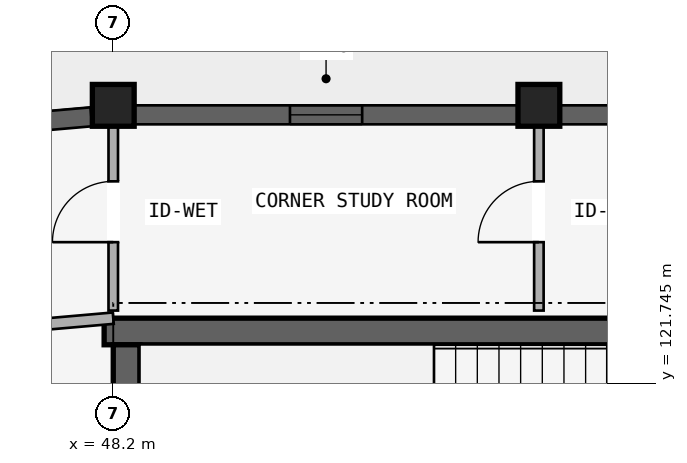
"""IFC4 building model, lengths in metres.
Left out: names, types, materials, properties, quantities, classifications, styles, units other than length and angle.
Written with IfcOpenShell. Run it as: python <this file> out.ifc"""

import sys

from ifc_helpers import new_model, si_unit, direction, frame, frame_2d, origin, origin_2d, place, context, subcontext, project, spatial, rectangle, extrude, element, fill, save


model = new_model("IFC4")
c1 = context("Model", 3, precision=1e-05, world=origin(), true_north=direction((0.0, 1.0)))
c2 = subcontext(c1, "Body", "Model", "MODEL_VIEW")
j1 = project(units=[si_unit("LENGTHUNIT", "METRE"), si_unit("PLANEANGLEUNIT", "RADIAN")], contexts=[c1])
p1 = place(None, origin())
s1 = spatial("IfcSite", under=j1, at=p1, CompositionType="ELEMENT")
p2 = place(p1, origin())
s2 = spatial("IfcBuilding", under=s1, at=p2, CompositionType="ELEMENT")
p3 = place(p2, frame((0.0, 0.0, 46.5)))
s3 = spatial("IfcBuildingStorey", under=s2, at=p3, CompositionType="ELEMENT", Elevation=46.5)
p4 = place(p3, frame((48.08, 122.425, 0.0), z_axis=(0.0, 0.0, 1.0), x_axis=(1.0, 0.0, 0.0)))
e1 = element("IfcWall", 1, at=p4, inside=s3, PredefinedType="SHEAR", context=c2, shape_type="SweptSolid", body=[
    extrude(rectangle(XDim=8.545, YDim=0.35, at=frame_2d((4.272, 0.0))), origin(), (0.0, 0.0, 1.0), 2.93),
])
p5 = place(p3, frame((48.375, 118.65, 0.0), z_axis=(0.0, 0.0, 1.0), x_axis=(0.0, 1.0, 0.0)))
e2 = element("IfcWall", 2, at=p5, inside=s3, PredefinedType="SHEAR", context=c2, shape_type="SweptSolid", body=[
    extrude(rectangle(XDim=3.6, YDim=0.35, at=frame_2d((1.8, 0.0))), origin(), (0.0, 0.0, 1.0), 2.93),
])
for number, where, z_axis, x_axis in (
    (3, (48.2, 125.4, 0.0), (0.0, 0.0, 1.0), (1.0, 0.0, 0.0)),
    (4, (53.8, 125.4, 0.0), (0.0, 0.0, 1.0), (1.0, 0.0, 0.0)),
):
    element("IfcColumn", number, at=place(p3, frame(where, z_axis=z_axis, x_axis=x_axis)), inside=s3, PredefinedType="COLUMN", context=c2, shape_type="SweptSolid", body=[
        extrude(rectangle(XDim=0.55, YDim=0.55, at=origin_2d()), origin(), (0.0, 0.0, 1.0), 2.97),
    ])
p6 = place(p3, frame((53.8, 122.7, 0.0), z_axis=(0.0, 0.0, 1.0), x_axis=(0.0, 1.0, 0.0)))
e5 = element("IfcWall", 5, at=p6, inside=s3, PredefinedType="PARTITIONING", context=c2, shape_type="SweptSolid", body=[
    extrude(rectangle(XDim=2.42, YDim=0.125, at=frame_2d((1.21, 0.0))), origin(), (0.0, 0.0, 1.0), 2.372),
])
p7 = place(p6, frame((0.9, 0.0, 0.0)))
e6 = element("IfcOpeningElement", 6, at=p7, cuts=e5, PredefinedType="OPENING", context=c2, shape_type="SweptSolid", body=[
    extrude(rectangle(XDim=0.8, YDim=2.1, at=frame_2d((0.4, 1.05))), frame((0.0, 0.073, 0.0), z_axis=(0.0, -1.0, 0.0), x_axis=(1.0, 0.0, 0.0)), (0.0, 0.0, 1.0), 0.145),
])
p8 = place(p3, frame((48.2, 122.7, 0.0), z_axis=(0.0, 0.0, 1.0), x_axis=(0.0, 1.0, 0.0)))
e7 = element("IfcWall", 7, at=p8, inside=s3, PredefinedType="PARTITIONING", context=c2, shape_type="SweptSolid", body=[
    extrude(rectangle(XDim=2.42, YDim=0.125, at=frame_2d((1.21, 0.0))), origin(), (0.0, 0.0, 1.0), 2.372),
])
p9 = place(p8, frame((0.9, 0.0, 0.0)))
e8 = element("IfcOpeningElement", 8, at=p9, cuts=e7, PredefinedType="OPENING", context=c2, shape_type="SweptSolid", body=[
    extrude(rectangle(XDim=0.8, YDim=2.1, at=frame_2d((0.4, 1.05))), frame((0.0, 0.073, 0.0), z_axis=(0.0, -1.0, 0.0), x_axis=(1.0, 0.0, 0.0)), (0.0, 0.0, 1.0), 0.145),
])
p10 = place(p3, frame((48.2, 122.6, 0.0), z_axis=(0.0, 0.0, 1.0), x_axis=(-0.996193018494, -0.087174938512, 0.0)))
e9 = element("IfcWall", 9, at=p10, inside=s3, PredefinedType="PLUMBINGWALL", context=c2, shape_type="SweptSolid", body=[
    extrude(rectangle(XDim=6.066, YDim=0.15, at=frame_2d((3.033, 0.0))), origin(), (0.0, 0.0, 1.0), 2.372),
])
p11 = place(p10, frame((2.653, 0.0, 0.0)))
e10 = element("IfcOpeningElement", 10, at=p11, cuts=e9, PredefinedType="OPENING", context=c2, shape_type="SweptSolid", body=[
    extrude(rectangle(XDim=0.76, YDim=2.05, at=frame_2d((0.38, 1.025))), frame((0.0, 0.085, 0.0), z_axis=(0.0, -1.0, 0.0), x_axis=(1.0, 0.0, 0.0)), (0.0, 0.0, 1.0), 0.17),
])
p12 = place(p3, frame((47.911, 125.249, 0.0), z_axis=(0.0, 0.0, 1.0), x_axis=(-0.996195052879, -0.087151687417, 0.0)))
e11 = element("IfcWall", 11, at=p12, inside=s3, PredefinedType="STANDARD", context=c2, shape_type="SweptSolid", body=[
    extrude(rectangle(XDim=5.953, YDim=0.25, at=frame_2d((2.977, 0.0))), origin(), (0.0, 0.0, 1.0), 2.48),
])
p13 = place(p12, frame((2.076, 0.0, 0.63)))
e12 = element("IfcOpeningElement", 12, at=p13, cuts=e11, PredefinedType="OPENING", context=c2, shape_type="SweptSolid", body=[
    extrude(rectangle(XDim=1.8, YDim=1.65, at=frame_2d((0.9, 0.825))), frame((0.0, 0.135, 0.0), z_axis=(0.0, -1.0, 0.0), x_axis=(1.0, 0.0, 0.0)), (0.0, 0.0, 1.0), 0.27),
])
p14 = place(p3, frame((48.479, 125.275, 0.0), z_axis=(0.0, 0.0, 1.0), x_axis=(1.0, 0.0, 0.0)))
e13 = element("IfcWall", 13, at=p14, inside=s3, PredefinedType="STANDARD", context=c2, shape_type="SweptSolid", body=[
    extrude(rectangle(XDim=5.043, YDim=0.25, at=frame_2d((2.521, 0.0))), origin(), (0.0, 0.0, 1.0), 2.48),
])
p15 = place(p14, frame((2.046, 0.0, 0.88)))
e14 = element("IfcOpeningElement", 14, at=p15, cuts=e13, PredefinedType="OPENING", context=c2, shape_type="SweptSolid", body=[
    extrude(rectangle(XDim=0.95, YDim=1.35, at=frame_2d((0.475, 0.675))), frame((0.0, 0.135, 0.0), z_axis=(0.0, -1.0, 0.0), x_axis=(1.0, 0.0, 0.0)), (0.0, 0.0, 1.0), 0.27),
])
p16 = place(p3, frame((54.079, 125.275, 0.0), z_axis=(0.0, 0.0, 1.0), x_axis=(1.0, 0.0, 0.0)))
e15 = element("IfcWall", 15, at=p16, inside=s3, PredefinedType="STANDARD", context=c2, shape_type="SweptSolid", body=[
    extrude(rectangle(XDim=5.043, YDim=0.25, at=frame_2d((2.521, 0.0))), origin(), (0.0, 0.0, 1.0), 2.48),
])
p17 = place(p16, frame((1.846, 0.0, 0.68)))
e16 = element("IfcOpeningElement", 16, at=p17, cuts=e15, PredefinedType="OPENING", context=c2, shape_type="SweptSolid", body=[
    extrude(rectangle(XDim=1.35, YDim=1.6, at=frame_2d((0.675, 0.8))), frame((0.0, 0.135, 0.0), z_axis=(0.0, -1.0, 0.0), x_axis=(1.0, 0.0, 0.0)), (0.0, 0.0, 1.0), 0.27),
])
p18 = place(p15, origin())
e17 = element("IfcWindow", 17, at=p18, inside=s3, PartitioningType="SINGLE_PANEL", PredefinedType="WINDOW", context=c2, shape_type="SweptSolid", body=[
    extrude(rectangle(XDim=0.95, YDim=1.35, at=frame_2d((0.475, 0.675))), frame((0.0, 0.03, 0.0), z_axis=(0.0, -1.0, 0.0), x_axis=(1.0, 0.0, 0.0)), (0.0, 0.0, 1.0), 0.06),
])
fill(e14, e17)
p19 = place(p7, origin())
e18 = element("IfcDoor", 18, at=p19, inside=s3, OperationType="SINGLE_SWING_LEFT", PredefinedType="DOOR", context=c2, shape_type="SweptSolid", body=[
    extrude(rectangle(XDim=0.8, YDim=2.1, at=frame_2d((0.4, 1.05))), frame((0.0, 0.025, 0.0), z_axis=(0.0, -1.0, 0.0), x_axis=(1.0, 0.0, 0.0)), (0.0, 0.0, 1.0), 0.05),
])
fill(e6, e18)
p20 = place(p9, origin())
e19 = element("IfcDoor", 19, at=p20, inside=s3, OperationType="SINGLE_SWING_LEFT", PredefinedType="DOOR", context=c2, shape_type="SweptSolid", body=[
    extrude(rectangle(XDim=0.8, YDim=2.1, at=frame_2d((0.4, 1.05))), frame((0.0, 0.025, 0.0), z_axis=(0.0, -1.0, 0.0), x_axis=(1.0, 0.0, 0.0)), (0.0, 0.0, 1.0), 0.05),
])
fill(e8, e19)
save(model, sys.argv[1])
